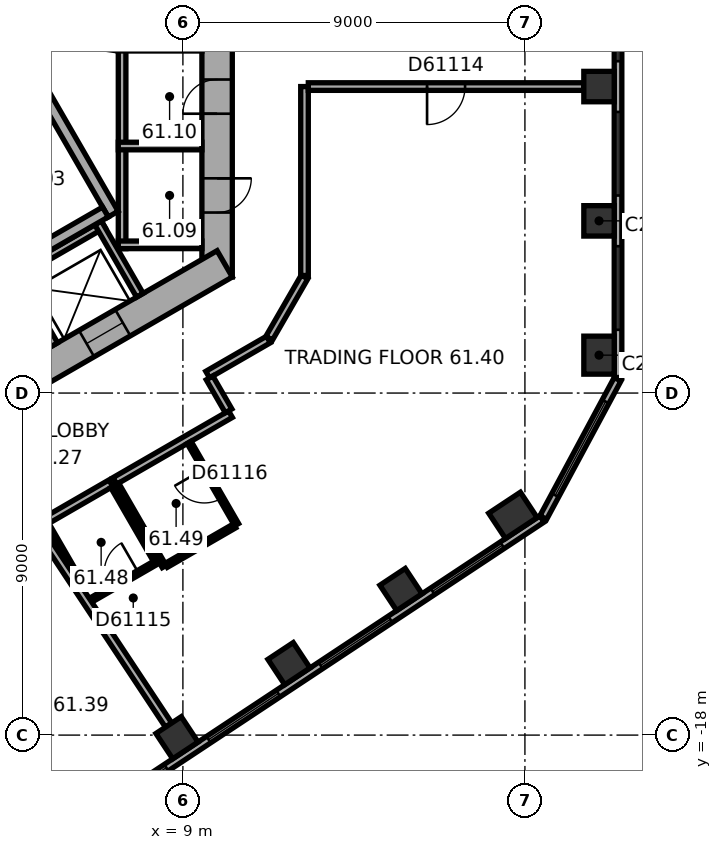
"""IFC4 building model, lengths in metres.
Left out: names, types, materials, properties, quantities, classifications, styles, units other than length and angle.
Written with IfcOpenShell. Run it as: python <this file> out.ifc"""

import sys

from ifc_helpers import new_model, si_unit, direction, frame, frame_2d, origin, origin_2d, place, context, subcontext, project, spatial, rectangle, extrude, element, fill, save


model = new_model("IFC4")
c1 = context("Model", 3, precision=1e-05, world=origin(), true_north=direction((0.0, 1.0)))
c2 = subcontext(c1, "Body", "Model", "MODEL_VIEW")
j1 = project(units=[si_unit("LENGTHUNIT", "METRE"), si_unit("PLANEANGLEUNIT", "RADIAN")], contexts=[c1])
p1 = place(None, origin())
s1 = spatial("IfcSite", under=j1, at=p1, CompositionType="ELEMENT")
p2 = place(p1, origin())
s2 = spatial("IfcBuilding", under=s1, at=p2, CompositionType="ELEMENT")
p3 = place(p2, frame((0.0, 0.0, 247.6)))
s3 = spatial("IfcBuildingStorey", under=s2, at=p3, CompositionType="ELEMENT", Elevation=247.6)
p4 = place(p3, frame((19.95, -8.003, 0.0), z_axis=(0.0, 0.0, 1.0), x_axis=(0.0, 1.0, 0.0)))
e1 = element("IfcColumn", 1, at=p4, inside=s3, PredefinedType="COLUMN", context=c2, shape_type="SweptSolid", body=[
    extrude(rectangle(XDim=1.0, YDim=0.8, at=origin_2d()), origin(), (0.0, 0.0, 1.0), 3.7),
])
for number, where, z_axis, x_axis in (
    (2, (19.95, -4.469, 0.0), (0.0, 0.0, 1.0), (0.0, 1.0, 0.0)),
    (3, (19.95, -0.936, 0.0), (0.0, 0.0, 1.0), (0.0, 1.0, 0.0)),
    (4, (8.844, -18.07, 0.0), (0.0, 0.0, 1.0), (0.834, 0.552, 0.0)),
    (5, (11.791, -16.12, 0.0), (0.0, 0.0, 1.0), (0.834, 0.552, 0.0)),
    (6, (14.738, -14.169, 0.0), (0.0, 0.0, 1.0), (0.834, 0.552, 0.0)),
):
    element("IfcColumn", number, at=place(p3, frame(where, z_axis=z_axis, x_axis=x_axis)), inside=s3, PredefinedType="COLUMN", context=c2, shape_type="SweptSolid", body=[
        extrude(rectangle(XDim=0.8, YDim=0.8, at=origin_2d()), origin(), (0.0, 0.0, 1.0), 3.7),
    ])
p5 = place(p3, frame((17.685, -12.219, 0.0), z_axis=(0.0, 0.0, 1.0), x_axis=(0.833885822067, 0.551936985312, 0.0)))
e7 = element("IfcColumn", 7, at=p5, inside=s3, PredefinedType="COLUMN", context=c2, shape_type="SweptSolid", body=[
    extrude(rectangle(XDim=1.0, YDim=0.8, at=origin_2d()), origin(), (0.0, 0.0, 1.0), 3.7),
])
p6 = place(p3, frame((9.9, -5.947, 0.0), z_axis=(0.0, 0.0, 1.0), x_axis=(0.0, 1.0, 0.0)))
e8 = element("IfcWall", 8, at=p6, inside=s3, PredefinedType="SHEAR", context=c2, shape_type="SweptSolid", body=[
    extrude(rectangle(XDim=11.894, YDim=0.8, at=frame_2d((5.947, 0.0))), origin(), (0.0, 0.0, 1.0), 3.7),
])
p7 = place(p6, frame((6.147, 0.0, 0.0)))
e9 = element("IfcOpeningElement", 9, at=p7, cuts=e8, PredefinedType="OPENING", context=c2, shape_type="SweptSolid", body=[
    extrude(rectangle(XDim=1.5, YDim=2.1, at=frame_2d((0.75, 1.05))), frame((0.0, 0.41, 0.0), z_axis=(0.0, -1.0, 0.0), x_axis=(1.0, 0.0, 0.0)), (0.0, 0.0, 1.0), 0.82),
])
p8 = place(p6, frame((1.697, 0.0, 0.0)))
e10 = element("IfcOpeningElement", 10, at=p8, cuts=e8, PredefinedType="OPENING", context=c2, shape_type="SweptSolid", body=[
    extrude(rectangle(XDim=0.9, YDim=2.1, at=frame_2d((0.45, 1.05))), frame((0.0, 0.41, 0.0), z_axis=(0.0, -1.0, 0.0), x_axis=(1.0, 0.0, 0.0)), (0.0, 0.0, 1.0), 0.82),
])
p9 = place(p6, frame((4.297, 0.0, 0.0)))
e11 = element("IfcOpeningElement", 11, at=p9, cuts=e8, PredefinedType="OPENING", context=c2, shape_type="SweptSolid", body=[
    extrude(rectangle(XDim=0.9, YDim=2.1, at=frame_2d((0.45, 1.05))), frame((0.0, 0.41, 0.0), z_axis=(0.0, -1.0, 0.0), x_axis=(1.0, 0.0, 0.0)), (0.0, 0.0, 1.0), 0.82),
])
p10 = place(p3, frame((-0.2, -11.547, 0.0), z_axis=(0.0, 0.0, 1.0), x_axis=(0.866023897231, 0.500002609418, 0.0)))
e12 = element("IfcWall", 12, at=p10, inside=s3, PredefinedType="SHEAR", context=c2, shape_type="SweptSolid", body=[
    extrude(rectangle(XDim=11.894, YDim=0.8, at=frame_2d((5.947, 0.0))), origin(), (0.0, 0.0, 1.0), 3.7),
])
p11 = place(p10, frame((2.497, 0.0, 0.0)))
e13 = element("IfcOpeningElement", 13, at=p11, cuts=e12, PredefinedType="OPENING", context=c2, shape_type="SweptSolid", body=[
    extrude(rectangle(XDim=1.1, YDim=2.1, at=frame_2d((0.55, 1.05))), frame((0.0, 0.41, 0.0), z_axis=(0.0, -1.0, 0.0), x_axis=(1.0, 0.0, 0.0)), (0.0, 0.0, 1.0), 0.82),
])
p12 = place(p10, frame((5.097, 0.0, 0.0)))
e14 = element("IfcOpeningElement", 14, at=p12, cuts=e12, PredefinedType="OPENING", context=c2, shape_type="SweptSolid", body=[
    extrude(rectangle(XDim=1.1, YDim=2.1, at=frame_2d((0.55, 1.05))), frame((0.0, 0.41, 0.0), z_axis=(0.0, -1.0, 0.0), x_axis=(1.0, 0.0, 0.0)), (0.0, 0.0, 1.0), 0.82),
])
p13 = place(p10, frame((7.697, 0.0, 0.0)))
e15 = element("IfcOpeningElement", 15, at=p13, cuts=e12, PredefinedType="OPENING", context=c2, shape_type="SweptSolid", body=[
    extrude(rectangle(XDim=1.1, YDim=2.1, at=frame_2d((0.55, 1.05))), frame((0.0, 0.41, 0.0), z_axis=(0.0, -1.0, 0.0), x_axis=(1.0, 0.0, 0.0)), (0.0, 0.0, 1.0), 0.82),
])
p14 = place(p3, frame((20.45, -8.59, 0.0), z_axis=(0.0, 0.0, 1.0), x_axis=(0.0, 1.0, 0.0)))
e16 = element("IfcWall", 16, at=p14, inside=s3, PredefinedType="STANDARD", context=c2, shape_type="SweptSolid", body=[
    extrude(rectangle(XDim=18.841, YDim=0.2, at=frame_2d((9.421, 0.0))), origin(), (0.0, 0.0, 1.0), 3.7),
])
p15 = place(p14, frame((1.254, 0.0, 0.9)))
e17 = element("IfcOpeningElement", 17, at=p15, cuts=e16, PredefinedType="OPENING", context=c2, shape_type="SweptSolid", body=[
    extrude(rectangle(XDim=2.2, YDim=2.0, at=frame_2d((1.1, 1.0))), frame((0.0, 0.11, 0.0), z_axis=(0.0, -1.0, 0.0), x_axis=(1.0, 0.0, 0.0)), (0.0, 0.0, 1.0), 0.22),
])
p16 = place(p14, frame((4.788, 0.0, 0.9)))
e18 = element("IfcOpeningElement", 18, at=p16, cuts=e16, PredefinedType="OPENING", context=c2, shape_type="SweptSolid", body=[
    extrude(rectangle(XDim=2.2, YDim=2.0, at=frame_2d((1.1, 1.0))), frame((0.0, 0.11, 0.0), z_axis=(0.0, -1.0, 0.0), x_axis=(1.0, 0.0, 0.0)), (0.0, 0.0, 1.0), 0.22),
])
p17 = place(p14, frame((8.322, 0.0, 0.9)))
e19 = element("IfcOpeningElement", 19, at=p17, cuts=e16, PredefinedType="OPENING", context=c2, shape_type="SweptSolid", body=[
    extrude(rectangle(XDim=2.2, YDim=2.0, at=frame_2d((1.1, 1.0))), frame((0.0, 0.11, 0.0), z_axis=(0.0, -1.0, 0.0), x_axis=(1.0, 0.0, 0.0)), (0.0, 0.0, 1.0), 0.22),
])
p18 = place(p14, frame((11.855, 0.0, 0.9)))
e20 = element("IfcOpeningElement", 20, at=p18, cuts=e16, PredefinedType="OPENING", context=c2, shape_type="SweptSolid", body=[
    extrude(rectangle(XDim=2.2, YDim=2.0, at=frame_2d((1.1, 1.0))), frame((0.0, 0.11, 0.0), z_axis=(0.0, -1.0, 0.0), x_axis=(1.0, 0.0, 0.0)), (0.0, 0.0, 1.0), 0.22),
])
p19 = place(p14, frame((15.389, 0.0, 0.9)))
e21 = element("IfcOpeningElement", 21, at=p19, cuts=e16, PredefinedType="OPENING", context=c2, shape_type="SweptSolid", body=[
    extrude(rectangle(XDim=2.2, YDim=2.0, at=frame_2d((1.1, 1.0))), frame((0.0, 0.11, 0.0), z_axis=(0.0, -1.0, 0.0), x_axis=(1.0, 0.0, 0.0)), (0.0, 0.0, 1.0), 0.22),
])
p20 = place(p3, frame((2.739, -22.711, 0.0), z_axis=(0.0, 0.0, 1.0), x_axis=(0.833885723098, 0.551937134838, 0.0)))
e22 = element("IfcWall", 22, at=p20, inside=s3, PredefinedType="STANDARD", context=c2, shape_type="SweptSolid", body=[
    extrude(rectangle(XDim=18.841, YDim=0.2, at=frame_2d((9.421, 0.0))), origin(), (0.0, 0.0, 1.0), 3.7),
])
p21 = place(p20, frame((1.252, 0.0, 0.9)))
e23 = element("IfcOpeningElement", 23, at=p21, cuts=e22, PredefinedType="OPENING", context=c2, shape_type="SweptSolid", body=[
    extrude(rectangle(XDim=2.2, YDim=2.0, at=frame_2d((1.1, 1.0))), frame((0.0, 0.11, 0.0), z_axis=(0.0, -1.0, 0.0), x_axis=(1.0, 0.0, 0.0)), (0.0, 0.0, 1.0), 0.22),
])
p22 = place(p20, frame((4.786, 0.0, 0.9)))
e24 = element("IfcOpeningElement", 24, at=p22, cuts=e22, PredefinedType="OPENING", context=c2, shape_type="SweptSolid", body=[
    extrude(rectangle(XDim=2.2, YDim=2.0, at=frame_2d((1.1, 1.0))), frame((0.0, 0.11, 0.0), z_axis=(0.0, -1.0, 0.0), x_axis=(1.0, 0.0, 0.0)), (0.0, 0.0, 1.0), 0.22),
])
p23 = place(p20, frame((8.32, 0.0, 0.9)))
e25 = element("IfcOpeningElement", 25, at=p23, cuts=e22, PredefinedType="OPENING", context=c2, shape_type="SweptSolid", body=[
    extrude(rectangle(XDim=2.2, YDim=2.0, at=frame_2d((1.1, 1.0))), frame((0.0, 0.11, 0.0), z_axis=(0.0, -1.0, 0.0), x_axis=(1.0, 0.0, 0.0)), (0.0, 0.0, 1.0), 0.22),
])
p24 = place(p20, frame((11.854, 0.0, 0.9)))
e26 = element("IfcOpeningElement", 26, at=p24, cuts=e22, PredefinedType="OPENING", context=c2, shape_type="SweptSolid", body=[
    extrude(rectangle(XDim=2.2, YDim=2.0, at=frame_2d((1.1, 1.0))), frame((0.0, 0.11, 0.0), z_axis=(0.0, -1.0, 0.0), x_axis=(1.0, 0.0, 0.0)), (0.0, 0.0, 1.0), 0.22),
])
p25 = place(p20, frame((15.387, 0.0, 0.9)))
e27 = element("IfcOpeningElement", 27, at=p25, cuts=e22, PredefinedType="OPENING", context=c2, shape_type="SweptSolid", body=[
    extrude(rectangle(XDim=2.2, YDim=2.0, at=frame_2d((1.1, 1.0))), frame((0.0, 0.11, 0.0), z_axis=(0.0, -1.0, 0.0), x_axis=(1.0, 0.0, 0.0)), (0.0, 0.0, 1.0), 0.22),
])
p26 = place(p3, frame((18.483, -12.276, 0.0), z_axis=(0.0, 0.0, 1.0), x_axis=(0.473267675015, 0.880918672629, 0.0)))
e28 = element("IfcWall", 28, at=p26, inside=s3, PredefinedType="STANDARD", context=c2, shape_type="SweptSolid", body=[
    extrude(rectangle(XDim=4.13, YDim=0.2, at=frame_2d((2.065, 0.0))), origin(), (0.0, 0.0, 1.0), 3.7),
])
p27 = place(p26, frame((0.665, 0.0, 0.9)))
e29 = element("IfcOpeningElement", 29, at=p27, cuts=e28, PredefinedType="OPENING", context=c2, shape_type="SweptSolid", body=[
    extrude(rectangle(XDim=2.8, YDim=2.0, at=frame_2d((1.4, 1.0))), frame((0.0, 0.11, 0.0), z_axis=(0.0, -1.0, 0.0), x_axis=(1.0, 0.0, 0.0)), (0.0, 0.0, 1.0), 0.22),
])
p28 = place(p3, frame((7.4, -5.2, 0.0), z_axis=(0.0, 0.0, 1.0), x_axis=(0.0, 1.0, 0.0)))
e30 = element("IfcWall", 30, at=p28, inside=s3, PredefinedType="PARTITIONING", context=c2, shape_type="SweptSolid", body=[
    extrude(rectangle(XDim=5.4, YDim=0.2, at=frame_2d((2.7, 0.0))), origin(), (0.0, 0.0, 1.0), 3.42),
])
for number, where, z_axis, x_axis in (
    (31, (7.3, -5.1, 0.0), (0.0, 0.0, 1.0), (1.0, 0.0, 0.0)),
    (32, (7.3, -2.5, 0.0), (0.0, 0.0, 1.0), (1.0, 0.0, 0.0)),
):
    element("IfcWall", number, at=place(p3, frame(where, z_axis=z_axis, x_axis=x_axis)), inside=s3, PredefinedType="PARTITIONING", context=c2, shape_type="SweptSolid", body=[
        extrude(rectangle(XDim=2.2, YDim=0.2, at=frame_2d((1.1, 0.0))), origin(), (0.0, 0.0, 1.0), 3.42),
    ])
p29 = place(p3, frame((-0.024, -8.559, 0.0), z_axis=(0.0, 0.0, 1.0), x_axis=(0.866026010844, 0.49999894854, 0.0)))
e33 = element("IfcWall", 33, at=p29, inside=s3, PredefinedType="PARTITIONING", context=c2, shape_type="SweptSolid", body=[
    extrude(rectangle(XDim=8.0, YDim=0.2, at=frame_2d((4.0, 0.0))), origin(), (0.0, 0.0, 1.0), 3.42),
])
for number, where, z_axis, x_axis in (
    (34, (4.516, -5.822, 0.0), (0.0, 0.0, 1.0), (0.5, -0.866, 0.0)),
    (35, (6.768, -4.522, 0.0), (0.0, 0.0, 1.0), (0.5, -0.866, 0.0)),
):
    element("IfcWall", number, at=place(p3, frame(where, z_axis=z_axis, x_axis=x_axis)), inside=s3, PredefinedType="PARTITIONING", context=c2, shape_type="SweptSolid", body=[
        extrude(rectangle(XDim=2.2, YDim=0.2, at=frame_2d((1.1, 0.0))), origin(), (0.0, 0.0, 1.0), 3.42),
    ])
p30 = place(p3, frame((4.816, -0.222, 0.0), z_axis=(0.0, 0.0, 1.0), x_axis=(0.499977259774, -0.866038532462, 0.0)))
e36 = element("IfcWall", 36, at=p30, inside=s3, PredefinedType="SHEAR", context=c2, shape_type="SweptSolid", body=[
    extrude(rectangle(XDim=4.7, YDim=0.3, at=frame_2d((2.35, 0.0))), origin(), (0.0, 0.0, 1.0), 3.42),
])
p31 = place(p3, frame((0.847, -7.767, 0.0), z_axis=(0.0, 0.0, 1.0), x_axis=(0.866027801685, 0.499995846692, 0.0)))
e37 = element("IfcWall", 37, at=p31, inside=s3, PredefinedType="SHEAR", context=c2, shape_type="SweptSolid", body=[
    extrude(rectangle(XDim=7.06, YDim=0.3, at=frame_2d((3.53, 0.0))), origin(), (0.0, 0.0, 1.0), 3.42),
])
p32 = place(p3, frame((5.373, -12.372, 0.0), z_axis=(0.0, 0.0, 1.0), x_axis=(0.866010750942, 0.50002537861, 0.0)))
e38 = element("IfcWall", 38, at=p32, inside=s3, PredefinedType="PARTITIONING", context=c2, shape_type="SweptSolid", body=[
    extrude(rectangle(XDim=2.0, YDim=0.2, at=frame_2d((1.0, 0.0))), origin(), (0.0, 0.0, 1.0), 3.42),
])
p33 = place(p3, frame((6.107, -13.644, 0.0), z_axis=(0.0, 0.0, 1.0), x_axis=(-0.500072492706, 0.865983546056, 0.0)))
e39 = element("IfcWall", 39, at=p33, inside=s3, PredefinedType="PARTITIONING", context=c2, shape_type="SweptSolid", body=[
    extrude(rectangle(XDim=1.368, YDim=0.12, at=frame_2d((0.684, 0.0))), origin(), (0.0, 0.0, 1.0), 3.42),
])
p34 = place(p3, frame((7.155, -11.459, 0.0), z_axis=(0.0, 0.0, 1.0), x_axis=(0.500077740698, -0.865980515519, 0.0)))
e40 = element("IfcWall", 40, at=p34, inside=s3, PredefinedType="PARTITIONING", context=c2, shape_type="SweptSolid", body=[
    extrude(rectangle(XDim=2.3, YDim=0.12, at=frame_2d((1.15, 0.0))), origin(), (0.0, 0.0, 1.0), 3.42),
])
p35 = place(p3, frame((7.208, -11.312, 0.0), z_axis=(0.0, 0.0, 1.0), x_axis=(0.866050243185, 0.499956974429, 0.0)))
e41 = element("IfcWall", 41, at=p35, inside=s3, PredefinedType="PARTITIONING", context=c2, shape_type="SweptSolid", body=[
    extrude(rectangle(XDim=3.514, YDim=0.2, at=frame_2d((1.757, 0.0))), origin(), (0.0, 0.0, 1.0), 3.42),
])
p36 = place(p3, frame((8.253, -13.481, 0.0), z_axis=(0.0, 0.0, 1.0), x_axis=(-0.866045024864, -0.499966013754, 0.0)))
e42 = element("IfcWall", 42, at=p36, inside=s3, PredefinedType="PARTITIONING", context=c2, shape_type="SweptSolid", body=[
    extrude(rectangle(XDim=1.88, YDim=0.12, at=frame_2d((0.94, 0.0))), origin(), (0.0, 0.0, 1.0), 3.42),
])
p37 = place(p36, frame((0.49, 0.0, 0.0)))
e43 = element("IfcOpeningElement", 43, at=p37, cuts=e42, PredefinedType="OPENING", context=c2, shape_type="SweptSolid", body=[
    extrude(rectangle(XDim=0.9, YDim=2.1, at=frame_2d((0.45, 1.05))), frame((0.0, 0.07, 0.0), z_axis=(0.0, -1.0, 0.0), x_axis=(1.0, 0.0, 0.0)), (0.0, 0.0, 1.0), 0.14),
])
p38 = place(p3, frame((8.509, -13.564, 0.0), z_axis=(0.0, 0.0, 1.0), x_axis=(-0.500004234368, 0.866022959057, 0.0)))
e44 = element("IfcWall", 44, at=p38, inside=s3, PredefinedType="PARTITIONING", context=c2, shape_type="SweptSolid", body=[
    extrude(rectangle(XDim=2.5, YDim=0.12, at=frame_2d((1.25, 0.0))), origin(), (0.0, 0.0, 1.0), 3.42),
])
p39 = place(p3, frame((8.624, -17.737, 0.0), z_axis=(0.0, 0.0, 1.0), x_axis=(-0.551945242328, 0.833880356809, 0.0)))
e45 = element("IfcWall", 45, at=p39, inside=s3, PredefinedType="PARTITIONING", context=c2, shape_type="SweptSolid", body=[
    extrude(rectangle(XDim=6.183, YDim=0.2, at=frame_2d((3.091, 0.0))), origin(), (0.0, 0.0, 1.0), 2.87),
])
p40 = place(p3, frame((9.164, -10.299, 0.0), z_axis=(0.0, 0.0, 1.0), x_axis=(0.500004234368, -0.866022959057, 0.0)))
e46 = element("IfcWall", 46, at=p40, inside=s3, PredefinedType="PARTITIONING", context=c2, shape_type="SweptSolid", body=[
    extrude(rectangle(XDim=2.5, YDim=0.12, at=frame_2d((1.25, 0.0))), origin(), (0.0, 0.0, 1.0), 3.42),
])
p41 = place(p40, frame((0.8, 0.0, 0.0)))
e47 = element("IfcOpeningElement", 47, at=p41, cuts=e46, PredefinedType="OPENING", context=c2, shape_type="SweptSolid", body=[
    extrude(rectangle(XDim=0.9, YDim=2.1, at=frame_2d((0.45, 1.05))), frame((0.0, 0.07, 0.0), z_axis=(0.0, -1.0, 0.0), x_axis=(1.0, 0.0, 0.0)), (0.0, 0.0, 1.0), 0.14),
])
p42 = place(p3, frame((9.652, -8.515, 0.0), z_axis=(0.0, 0.0, 1.0), x_axis=(0.866020375458, 0.500008709215, 0.0)))
e48 = element("IfcWall", 48, at=p42, inside=s3, PredefinedType="PARTITIONING", context=c2, shape_type="SweptSolid", body=[
    extrude(rectangle(XDim=1.846, YDim=0.2, at=frame_2d((0.923, 0.0))), origin(), (0.0, 0.0, 1.0), 3.42),
])
p43 = place(p3, frame((10.202, -9.469, 0.0), z_axis=(0.0, 0.0, 1.0), x_axis=(-0.499968756647, 0.866043441391, 0.0)))
e49 = element("IfcWall", 49, at=p43, inside=s3, PredefinedType="PARTITIONING", context=c2, shape_type="SweptSolid", body=[
    extrude(rectangle(XDim=1.001, YDim=0.2, at=frame_2d((0.5, 0.0))), origin(), (0.0, 0.0, 1.0), 3.42),
])
p44 = place(p3, frame((10.362, -12.494, 0.0), z_axis=(0.0, 0.0, 1.0), x_axis=(-0.866009661879, -0.500027264788, 0.0)))
e50 = element("IfcWall", 50, at=p44, inside=s3, PredefinedType="PARTITIONING", context=c2, shape_type="SweptSolid", body=[
    extrude(rectangle(XDim=2.08, YDim=0.12, at=frame_2d((1.04, 0.0))), origin(), (0.0, 0.0, 1.0), 3.42),
])
p45 = place(p3, frame((11.27, -7.558, 0.0), z_axis=(0.0, 0.0, 1.0), x_axis=(0.499964847546, 0.866045698112, 0.0)))
e51 = element("IfcWall", 51, at=p45, inside=s3, PredefinedType="PARTITIONING", context=c2, shape_type="SweptSolid", body=[
    extrude(rectangle(XDim=1.86, YDim=0.2, at=frame_2d((0.93, 0.0))), origin(), (0.0, 0.0, 1.0), 3.42),
])
p46 = place(p3, frame((12.2, -5.907, 0.0), z_axis=(0.0, 0.0, 1.0), x_axis=(0.0, 1.0, 0.0)))
e52 = element("IfcWall", 52, at=p46, inside=s3, PredefinedType="PARTITIONING", context=c2, shape_type="SweptSolid", body=[
    extrude(rectangle(XDim=4.971, YDim=0.2, at=frame_2d((2.486, 0.0))), origin(), (0.0, 0.0, 1.0), 3.42),
])
p47 = place(p3, frame((12.3, -0.936, 0.0), z_axis=(0.0, 0.0, 1.0), x_axis=(1.0, 0.0, 0.0)))
e53 = element("IfcWall", 53, at=p47, inside=s3, PredefinedType="PARTITIONING", context=c2, shape_type="SweptSolid", body=[
    extrude(rectangle(XDim=7.25, YDim=0.2, at=frame_2d((3.625, 0.0))), origin(), (0.0, 0.0, 1.0), 2.87),
])
p48 = place(p47, frame((3.125, 0.0, 0.0)))
e54 = element("IfcOpeningElement", 54, at=p48, cuts=e53, PredefinedType="OPENING", context=c2, shape_type="SweptSolid", body=[
    extrude(rectangle(XDim=1.0, YDim=2.1, at=frame_2d((0.5, 1.05))), frame((0.0, 0.11, 0.0), z_axis=(0.0, -1.0, 0.0), x_axis=(1.0, 0.0, 0.0)), (0.0, 0.0, 1.0), 0.22),
])
p49 = place(p15, origin())
e55 = element("IfcWindow", 55, at=p49, inside=s3, PartitioningType="SINGLE_PANEL", PredefinedType="WINDOW", context=c2, shape_type="SweptSolid", body=[
    extrude(rectangle(XDim=2.2, YDim=2.0, at=frame_2d((1.1, 1.0))), frame((0.0, 0.03, 0.0), z_axis=(0.0, -1.0, 0.0), x_axis=(1.0, 0.0, 0.0)), (0.0, 0.0, 1.0), 0.06),
])
fill(e17, e55)
p50 = place(p16, origin())
e56 = element("IfcWindow", 56, at=p50, inside=s3, PartitioningType="SINGLE_PANEL", PredefinedType="WINDOW", context=c2, shape_type="SweptSolid", body=[
    extrude(rectangle(XDim=2.2, YDim=2.0, at=frame_2d((1.1, 1.0))), frame((0.0, 0.03, 0.0), z_axis=(0.0, -1.0, 0.0), x_axis=(1.0, 0.0, 0.0)), (0.0, 0.0, 1.0), 0.06),
])
fill(e18, e56)
p51 = place(p17, origin())
e57 = element("IfcWindow", 57, at=p51, inside=s3, PartitioningType="SINGLE_PANEL", PredefinedType="WINDOW", context=c2, shape_type="SweptSolid", body=[
    extrude(rectangle(XDim=2.2, YDim=2.0, at=frame_2d((1.1, 1.0))), frame((0.0, 0.03, 0.0), z_axis=(0.0, -1.0, 0.0), x_axis=(1.0, 0.0, 0.0)), (0.0, 0.0, 1.0), 0.06),
])
fill(e19, e57)
p52 = place(p22, origin())
e58 = element("IfcWindow", 58, at=p52, inside=s3, PartitioningType="SINGLE_PANEL", PredefinedType="WINDOW", context=c2, shape_type="SweptSolid", body=[
    extrude(rectangle(XDim=2.2, YDim=2.0, at=frame_2d((1.1, 1.0))), frame((0.0, 0.03, 0.0), z_axis=(0.0, -1.0, 0.0), x_axis=(1.0, 0.0, 0.0)), (0.0, 0.0, 1.0), 0.06),
])
fill(e24, e58)
p53 = place(p23, origin())
e59 = element("IfcWindow", 59, at=p53, inside=s3, PartitioningType="SINGLE_PANEL", PredefinedType="WINDOW", context=c2, shape_type="SweptSolid", body=[
    extrude(rectangle(XDim=2.2, YDim=2.0, at=frame_2d((1.1, 1.0))), frame((0.0, 0.03, 0.0), z_axis=(0.0, -1.0, 0.0), x_axis=(1.0, 0.0, 0.0)), (0.0, 0.0, 1.0), 0.06),
])
fill(e25, e59)
p54 = place(p24, origin())
e60 = element("IfcWindow", 60, at=p54, inside=s3, PartitioningType="SINGLE_PANEL", PredefinedType="WINDOW", context=c2, shape_type="SweptSolid", body=[
    extrude(rectangle(XDim=2.2, YDim=2.0, at=frame_2d((1.1, 1.0))), frame((0.0, 0.03, 0.0), z_axis=(0.0, -1.0, 0.0), x_axis=(1.0, 0.0, 0.0)), (0.0, 0.0, 1.0), 0.06),
])
fill(e26, e60)
p55 = place(p25, origin())
e61 = element("IfcWindow", 61, at=p55, inside=s3, PartitioningType="SINGLE_PANEL", PredefinedType="WINDOW", context=c2, shape_type="SweptSolid", body=[
    extrude(rectangle(XDim=2.2, YDim=2.0, at=frame_2d((1.1, 1.0))), frame((0.0, 0.03, 0.0), z_axis=(0.0, -1.0, 0.0), x_axis=(1.0, 0.0, 0.0)), (0.0, 0.0, 1.0), 0.06),
])
fill(e27, e61)
p56 = place(p27, origin())
e62 = element("IfcWindow", 62, at=p56, inside=s3, PartitioningType="SINGLE_PANEL", PredefinedType="WINDOW", context=c2, shape_type="SweptSolid", body=[
    extrude(rectangle(XDim=2.8, YDim=2.0, at=frame_2d((1.4, 1.0))), frame((0.0, 0.03, 0.0), z_axis=(0.0, -1.0, 0.0), x_axis=(1.0, 0.0, 0.0)), (0.0, 0.0, 1.0), 0.06),
])
fill(e29, e62)
p57 = place(p8, origin())
e63 = element("IfcDoor", 63, at=p57, inside=s3, OperationType="SINGLE_SWING_LEFT", PredefinedType="DOOR", context=c2, shape_type="SweptSolid", body=[
    extrude(rectangle(XDim=0.9, YDim=2.1, at=frame_2d((0.45, 1.05))), frame((0.0, 0.025, 0.0), z_axis=(0.0, -1.0, 0.0), x_axis=(1.0, 0.0, 0.0)), (0.0, 0.0, 1.0), 0.05),
])
fill(e10, e63)
p58 = place(p9, origin())
e64 = element("IfcDoor", 64, at=p58, inside=s3, OperationType="SINGLE_SWING_LEFT", PredefinedType="DOOR", context=c2, shape_type="SweptSolid", body=[
    extrude(rectangle(XDim=0.9, YDim=2.1, at=frame_2d((0.45, 1.05))), frame((0.0, 0.025, 0.0), z_axis=(0.0, -1.0, 0.0), x_axis=(1.0, 0.0, 0.0)), (0.0, 0.0, 1.0), 0.05),
])
fill(e11, e64)
p59 = place(p13, origin())
e65 = element("IfcDoor", 65, at=p59, inside=s3, OperationType="DOUBLE_DOOR_SLIDING", PredefinedType="DOOR", context=c2, shape_type="SweptSolid", body=[
    extrude(rectangle(XDim=1.1, YDim=2.1, at=frame_2d((0.55, 1.05))), frame((0.0, 0.025, 0.0), z_axis=(0.0, -1.0, 0.0), x_axis=(1.0, 0.0, 0.0)), (0.0, 0.0, 1.0), 0.05),
])
fill(e15, e65)
p60 = place(p48, origin())
e66 = element("IfcDoor", 66, at=p60, inside=s3, OperationType="SINGLE_SWING_LEFT", PredefinedType="DOOR", context=c2, shape_type="SweptSolid", body=[
    extrude(rectangle(XDim=1.0, YDim=2.1, at=frame_2d((0.5, 1.05))), frame((0.0, 0.025, 0.0), z_axis=(0.0, -1.0, 0.0), x_axis=(1.0, 0.0, 0.0)), (0.0, 0.0, 1.0), 0.05),
])
fill(e54, e66)
p61 = place(p37, origin())
e67 = element("IfcDoor", 67, at=p61, inside=s3, OperationType="SINGLE_SWING_LEFT", PredefinedType="DOOR", context=c2, shape_type="SweptSolid", body=[
    extrude(rectangle(XDim=0.9, YDim=2.1, at=frame_2d((0.45, 1.05))), frame((0.0, 0.025, 0.0), z_axis=(0.0, -1.0, 0.0), x_axis=(1.0, 0.0, 0.0)), (0.0, 0.0, 1.0), 0.05),
])
fill(e43, e67)
p62 = place(p41, origin())
e68 = element("IfcDoor", 68, at=p62, inside=s3, OperationType="SINGLE_SWING_LEFT", PredefinedType="DOOR", context=c2, shape_type="SweptSolid", body=[
    extrude(rectangle(XDim=0.9, YDim=2.1, at=frame_2d((0.45, 1.05))), frame((0.0, 0.025, 0.0), z_axis=(0.0, -1.0, 0.0), x_axis=(1.0, 0.0, 0.0)), (0.0, 0.0, 1.0), 0.05),
])
fill(e47, e68)
save(model, sys.argv[1])
